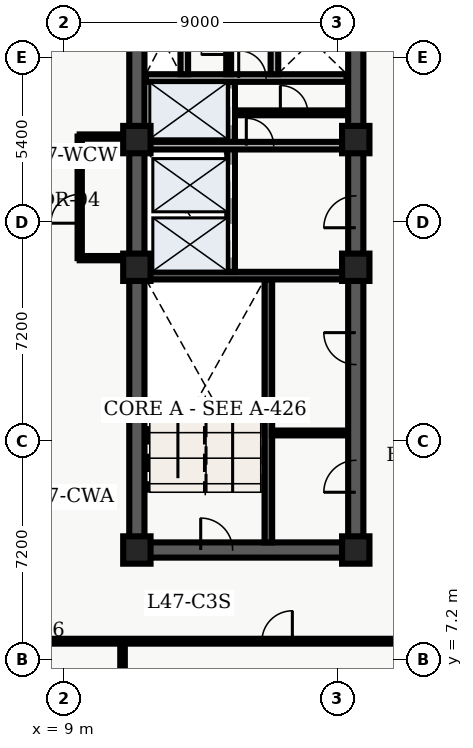
"""IFC4 building model, lengths in metres.
Left out: names, types, materials, properties, quantities, classifications, styles, units other than length and angle.
Written with IfcOpenShell. Run it as: python <this file> out.ifc"""

import sys

from ifc_helpers import new_model, entity, si_unit, converted_unit, direction, frame, origin_with_axes, origin_2d_with_axis, place, context, subcontext, project, spatial, polyline, rectangle, outline, extrude, element, fill, save


model = new_model("IFC4")
c1 = context("Model", 3, precision=1e-05, world=origin_with_axes(), true_north=direction((0.0, 1.0)))
c2 = subcontext(c1, "Body", "Model", "MODEL_VIEW")
j1 = project(units=[si_unit("LENGTHUNIT", "METRE"), converted_unit("PLANEANGLEUNIT", "DEGREE", entity("IfcPlaneAngleMeasure", 0.017), si_unit("PLANEANGLEUNIT", "RADIAN"), dimensions=[0, 0, 0, 0, 0, 0, 0])], contexts=[c1])
p1 = place(None, origin_with_axes())
s1 = spatial("IfcSite", under=j1, at=p1, CompositionType="ELEMENT")
p2 = place(p1, origin_with_axes())
s2 = spatial("IfcBuilding", under=s1, at=p2, CompositionType="ELEMENT")
p3 = place(p2, frame((0.0, 0.0, 192.6), z_axis=(0.0, 0.0, 1.0), x_axis=(1.0, 0.0, 0.0)))
s3 = spatial("IfcBuildingStorey", under=s2, at=p3, CompositionType="ELEMENT", Elevation=192.6)
p4 = place(p3, frame((11.4, 10.8, 0.0), z_axis=(0.0, 0.0, 1.0), x_axis=(0.0, 1.0, 0.0)))
e1 = element("IfcWall", 1, at=p4, inside=s3, PredefinedType="SHEAR", context=c2, shape_type="SweptSolid", body=[
    extrude(outline(polyline([(0.0, -0.25), (27.0, -0.25), (27.0, 0.25), (0.0, 0.25), (0.0, -0.25)])), origin_with_axes(), (0.0, 0.0, 1.0), 3.66),
])
p5 = place(p3, frame((11.4, 10.8, 0.0), z_axis=(0.0, 0.0, 1.0), x_axis=(1.0, 0.0, 0.0)))
e2 = element("IfcWall", 2, at=p5, inside=s3, PredefinedType="SHEAR", context=c2, shape_type="SweptSolid", body=[
    extrude(outline(polyline([(0.0, -0.25), (7.2, -0.25), (7.2, 0.25), (0.0, 0.25), (0.0, -0.25)])), origin_with_axes(), (0.0, 0.0, 1.0), 3.66),
])
p6 = place(p5, frame((2.625, 0.0, 0.0), z_axis=(0.0, 0.0, 1.0), x_axis=(1.0, 0.0, 0.0)))
e3 = element("IfcOpeningElement", 3, at=p6, cuts=e2, PredefinedType="OPENING", context=c2, shape_type="SweptSolid", body=[
    extrude(rectangle(XDim=1.05, YDim=0.52, at=origin_2d_with_axis()), origin_with_axes(), (0.0, 0.0, 1.0), 2.15),
])
p7 = place(p3, frame((18.6, 10.8, 0.0), z_axis=(0.0, 0.0, 1.0), x_axis=(0.0, 1.0, 0.0)))
e4 = element("IfcWall", 4, at=p7, inside=s3, PredefinedType="SHEAR", context=c2, shape_type="SweptSolid", body=[
    extrude(outline(polyline([(0.0, -0.25), (13.5, -0.25), (13.5, 0.25), (0.0, 0.25), (0.0, -0.25)])), origin_with_axes(), (0.0, 0.0, 1.0), 3.66),
])
p8 = place(p7, frame((11.125, 0.0, 0.0), z_axis=(0.0, 0.0, 1.0), x_axis=(1.0, 0.0, 0.0)))
e5 = element("IfcOpeningElement", 5, at=p8, cuts=e4, PredefinedType="OPENING", context=c2, shape_type="SweptSolid", body=[
    extrude(rectangle(XDim=1.05, YDim=0.52, at=origin_2d_with_axis()), origin_with_axes(), (0.0, 0.0, 1.0), 2.15),
])
p9 = place(p7, frame((2.425, 0.0, 0.0), z_axis=(0.0, 0.0, 1.0), x_axis=(1.0, 0.0, 0.0)))
e6 = element("IfcOpeningElement", 6, at=p9, cuts=e4, PredefinedType="OPENING", context=c2, shape_type="SweptSolid", body=[
    extrude(rectangle(XDim=1.05, YDim=0.52, at=origin_2d_with_axis()), origin_with_axes(), (0.0, 0.0, 1.0), 2.15),
])
p10 = place(p7, frame((6.625, 0.0, 0.0), z_axis=(0.0, 0.0, 1.0), x_axis=(1.0, 0.0, 0.0)))
e7 = element("IfcOpeningElement", 7, at=p10, cuts=e4, PredefinedType="OPENING", context=c2, shape_type="SweptSolid", body=[
    extrude(rectangle(XDim=1.05, YDim=0.52, at=origin_2d_with_axis()), origin_with_axes(), (0.0, 0.0, 1.0), 2.15),
])
p11 = place(p3, frame((18.6, 24.3, 0.0), z_axis=(0.0, 0.0, 1.0), x_axis=(0.0, 1.0, 0.0)))
e8 = element("IfcWall", 8, at=p11, inside=s3, PredefinedType="SHEAR", context=c2, shape_type="SweptSolid", body=[
    extrude(outline(polyline([(0.0, -0.25), (13.5, -0.25), (13.5, 0.25), (0.0, 0.25), (0.0, -0.25)])), origin_with_axes(), (0.0, 0.0, 1.0), 3.66),
])
p12 = place(p11, frame((5.65, 0.0, 0.0), z_axis=(0.0, 0.0, 1.0), x_axis=(1.0, 0.0, 0.0)))
e9 = element("IfcOpeningElement", 9, at=p12, cuts=e8, PredefinedType="OPENING", context=c2, shape_type="SweptSolid", body=[
    extrude(rectangle(XDim=1.1, YDim=0.52, at=origin_2d_with_axis()), origin_with_axes(), (0.0, 0.0, 1.0), 2.15),
])
p13 = place(p11, frame((7.75, 0.0, 0.0), z_axis=(0.0, 0.0, 1.0), x_axis=(1.0, 0.0, 0.0)))
e10 = element("IfcOpeningElement", 10, at=p13, cuts=e8, PredefinedType="OPENING", context=c2, shape_type="SweptSolid", body=[
    extrude(rectangle(XDim=1.1, YDim=0.52, at=origin_2d_with_axis()), origin_with_axes(), (0.0, 0.0, 1.0), 2.15),
])
p14 = place(p3, frame((15.725, 11.05, 0.0), z_axis=(0.0, 0.0, 1.0), x_axis=(0.0, 1.0, 0.0)))
e11 = element("IfcWall", 11, at=p14, inside=s3, PredefinedType="SHEAR", context=c2, shape_type="SweptSolid", body=[
    extrude(outline(polyline([(0.0, -0.125), (8.65, -0.125), (8.65, 0.125), (0.0, 0.125), (0.0, -0.125)])), origin_with_axes(), (0.0, 0.0, 1.0), 3.66),
])
p15 = place(p3, frame((11.65, 19.825, 0.0), z_axis=(0.0, 0.0, 1.0), x_axis=(1.0, 0.0, 0.0)))
e12 = element("IfcWall", 12, at=p15, inside=s3, PredefinedType="SHEAR", context=c2, shape_type="SweptSolid", body=[
    extrude(outline(polyline([(0.0, -0.125), (6.7, -0.125), (6.7, 0.125), (0.0, 0.125), (0.0, -0.125)])), origin_with_axes(), (0.0, 0.0, 1.0), 3.66),
])
p16 = place(p3, frame((14.5, 19.95, 0.0), z_axis=(0.0, 0.0, 1.0), x_axis=(0.0, 1.0, 0.0)))
e13 = element("IfcWall", 13, at=p16, inside=s3, PredefinedType="SOLIDWALL", context=c2, shape_type="SweptSolid", body=[
    extrude(outline(polyline([(0.0, -0.125), (6.25, -0.125), (6.25, 0.125), (0.0, 0.125), (0.0, -0.125)])), origin_with_axes(), (0.0, 0.0, 1.0), 2.7),
])
p17 = place(p16, frame((1.025, 0.0, 0.0), z_axis=(0.0, 0.0, 1.0), x_axis=(1.0, 0.0, 0.0)))
e14 = element("IfcOpeningElement", 14, at=p17, cuts=e13, PredefinedType="OPENING", context=c2, shape_type="SweptSolid", body=[
    extrude(rectangle(XDim=1.1, YDim=0.27, at=origin_2d_with_axis()), origin_with_axes(), (0.0, 0.0, 1.0), 2.15),
])
p18 = place(p16, frame((2.975, 0.0, 0.0), z_axis=(0.0, 0.0, 1.0), x_axis=(1.0, 0.0, 0.0)))
e15 = element("IfcOpeningElement", 15, at=p18, cuts=e13, PredefinedType="OPENING", context=c2, shape_type="SweptSolid", body=[
    extrude(rectangle(XDim=1.1, YDim=0.27, at=origin_2d_with_axis()), origin_with_axes(), (0.0, 0.0, 1.0), 2.15),
])
p19 = place(p16, frame((5.425, 0.0, 0.0), z_axis=(0.0, 0.0, 1.0), x_axis=(1.0, 0.0, 0.0)))
e16 = element("IfcOpeningElement", 16, at=p19, cuts=e13, PredefinedType="OPENING", context=c2, shape_type="SweptSolid", body=[
    extrude(rectangle(XDim=1.2, YDim=0.27, at=origin_2d_with_axis()), origin_with_axes(), (0.0, 0.0, 1.0), 2.15),
])
p20 = place(p3, frame((11.7, 24.1, 0.0), z_axis=(0.0, 0.0, 1.0), x_axis=(1.0, 0.0, 0.0)))
e17 = element("IfcWall", 17, at=p20, inside=s3, PredefinedType="SOLIDWALL", context=c2, shape_type="SweptSolid", body=[
    extrude(outline(polyline([(0.0, -0.125), (6.6, -0.125), (6.6, 0.125), (0.0, 0.125), (0.0, -0.125)])), origin_with_axes(), (0.0, 0.0, 1.0), 2.7),
])
p21 = place(p20, frame((3.75, 0.0, 0.0), z_axis=(0.0, 0.0, 1.0), x_axis=(1.0, 0.0, 0.0)))
e18 = element("IfcOpeningElement", 18, at=p21, cuts=e17, PredefinedType="OPENING", context=c2, shape_type="SweptSolid", body=[
    extrude(rectangle(XDim=0.9, YDim=0.27, at=origin_2d_with_axis()), origin_with_axes(), (0.0, 0.0, 1.0), 2.15),
])
p22 = place(p3, frame((11.7, 26.325, 0.0), z_axis=(0.0, 0.0, 1.0), x_axis=(1.0, 0.0, 0.0)))
e19 = element("IfcWall", 19, at=p22, inside=s3, PredefinedType="SOLIDWALL", context=c2, shape_type="SweptSolid", body=[
    extrude(outline(polyline([(0.0, -0.125), (6.6, -0.125), (6.6, 0.125), (0.0, 0.125), (0.0, -0.125)])), origin_with_axes(), (0.0, 0.0, 1.0), 2.7),
])
p23 = place(p22, frame((3.5, 0.0, 0.0), z_axis=(0.0, 0.0, 1.0), x_axis=(1.0, 0.0, 0.0)))
e20 = element("IfcOpeningElement", 20, at=p23, cuts=e19, PredefinedType="OPENING", context=c2, shape_type="SweptSolid", body=[
    extrude(rectangle(XDim=0.9, YDim=0.27, at=origin_2d_with_axis()), origin_with_axes(), (0.0, 0.0, 1.0), 2.15),
])
for number, where, z_axis, x_axis in (
    (21, (12.96, 26.45, 0.0), (0.0, 0.0, 1.0), (0.0, 1.0, 0.0)),
    (22, (15.925, 26.45, 0.0), (0.0, 0.0, 1.0), (0.0, 1.0, 0.0)),
):
    element("IfcWall", number, at=place(p3, frame(where, z_axis=z_axis, x_axis=x_axis)), inside=s3, PredefinedType="SOLIDWALL", context=c2, shape_type="SweptSolid", body=[
        extrude(outline(polyline([(0.0, -0.125), (2.2, -0.125), (2.2, 0.125), (0.0, 0.125), (0.0, -0.125)])), origin_with_axes(), (0.0, 0.0, 1.0), 2.7),
    ])
for number, where, z_axis, x_axis in (
    (23, (11.4, 10.8, 0.0), (0.0, 0.0, 1.0), (1.0, 0.0, 0.0)),
    (24, (11.4, 20.1, 0.0), (0.0, 0.0, 1.0), (1.0, 0.0, 0.0)),
    (25, (11.4, 24.3, 0.0), (0.0, 0.0, 1.0), (1.0, 0.0, 0.0)),
    (26, (18.6, 10.8, 0.0), (0.0, 0.0, 1.0), (1.0, 0.0, 0.0)),
    (27, (18.6, 20.1, 0.0), (0.0, 0.0, 1.0), (1.0, 0.0, 0.0)),
    (28, (18.6, 24.3, 0.0), (0.0, 0.0, 1.0), (1.0, 0.0, 0.0)),
):
    element("IfcColumn", number, at=place(p3, frame(where, z_axis=z_axis, x_axis=x_axis)), inside=s3, PredefinedType="COLUMN", context=c2, shape_type="SweptSolid", body=[
        extrude(rectangle(XDim=0.9, YDim=0.9, at=origin_2d_with_axis()), origin_with_axes(), (0.0, 0.0, 1.0), 3.9),
    ])
p24 = place(p3, frame((14.62, 25.18, 0.0), z_axis=(0.0, 0.0, 1.0), x_axis=(1.0, 0.0, 0.0)))
e29 = element("IfcWall", 29, at=p24, inside=s3, PredefinedType="PARTITIONING", context=c2, shape_type="SweptSolid", body=[
    extrude(outline(polyline([(0.0, -0.08), (3.68, -0.08), (3.68, 0.08), (0.0, 0.08), (0.0, -0.08)])), origin_with_axes(), (0.0, 0.0, 1.0), 2.7),
])
p25 = place(p24, frame((1.95, 0.0, 0.0), z_axis=(0.0, 0.0, 1.0), x_axis=(1.0, 0.0, 0.0)))
e30 = element("IfcOpeningElement", 30, at=p25, cuts=e29, PredefinedType="OPENING", context=c2, shape_type="SweptSolid", body=[
    extrude(rectangle(XDim=0.9, YDim=0.18, at=origin_2d_with_axis()), origin_with_axes(), (0.0, 0.0, 1.0), 2.15),
])
p26 = place(p3, frame((14.42, 26.45, 0.0), z_axis=(0.0, 0.0, 1.0), x_axis=(0.0, 1.0, 0.0)))
e31 = element("IfcWall", 31, at=p26, inside=s3, PredefinedType="PARTITIONING", context=c2, shape_type="SweptSolid", body=[
    extrude(outline(polyline([(0.0, -0.08), (2.2, -0.08), (2.2, 0.08), (0.0, 0.08), (0.0, -0.08)])), origin_with_axes(), (0.0, 0.0, 1.0), 2.7),
])
p27 = place(p26, frame((1.1, 0.0, 0.0), z_axis=(0.0, 0.0, 1.0), x_axis=(1.0, 0.0, 0.0)))
e32 = element("IfcOpeningElement", 32, at=p27, cuts=e31, PredefinedType="OPENING", context=c2, shape_type="SweptSolid", body=[
    extrude(rectangle(XDim=0.9, YDim=0.18, at=origin_2d_with_axis()), origin_with_axes(), (0.0, 0.0, 1.0), 2.15),
])
p28 = place(p3, frame((15.84, 14.65, 0.0), z_axis=(0.0, 0.0, 1.0), x_axis=(1.0, 0.0, 0.0)))
e33 = element("IfcWall", 33, at=p28, inside=s3, PredefinedType="PARTITIONING", context=c2, shape_type="SweptSolid", body=[
    extrude(outline(polyline([(0.0, -0.08), (2.46, -0.08), (2.46, 0.08), (0.0, 0.08), (0.0, -0.08)])), origin_with_axes(), (0.0, 0.0, 1.0), 2.7),
])
p29 = place(p3, frame((9.52, 20.4, 0.0), z_axis=(0.0, 0.0, 1.0), x_axis=(0.0, 1.0, 0.0)))
e34 = element("IfcWall", 34, at=p29, inside=s3, PredefinedType="PARTITIONING", context=c2, shape_type="SweptSolid", body=[
    extrude(outline(polyline([(0.0, -0.07), (4.0, -0.07), (4.0, 0.07), (0.0, 0.07), (0.0, -0.07)])), origin_with_axes(), (0.0, 0.0, 1.0), 2.7),
])
p30 = place(p29, frame((1.625, 0.0, 0.0), z_axis=(0.0, 0.0, 1.0), x_axis=(1.0, 0.0, 0.0)))
e35 = element("IfcOpeningElement", 35, at=p30, cuts=e34, PredefinedType="OPENING", context=c2, shape_type="SweptSolid", body=[
    extrude(rectangle(XDim=0.95, YDim=0.16, at=origin_2d_with_axis()), origin_with_axes(), (0.0, 0.0, 1.0), 2.15),
])
for number, where, z_axis, x_axis in (
    (36, (9.52, 20.4, 0.0), (0.0, 0.0, 1.0), (1.0, 0.0, 0.0)),
    (37, (9.52, 24.4, 0.0), (0.0, 0.0, 1.0), (1.0, 0.0, 0.0)),
):
    element("IfcWall", number, at=place(p3, frame(where, z_axis=z_axis, x_axis=x_axis)), inside=s3, PredefinedType="PARTITIONING", context=c2, shape_type="SweptSolid", body=[
        extrude(outline(polyline([(0.0, -0.07), (1.58, -0.07), (1.58, 0.07), (0.0, 0.07), (0.0, -0.07)])), origin_with_axes(), (0.0, 0.0, 1.0), 2.7),
    ])
p31 = place(p3, frame((2.6, 7.8, 0.0), z_axis=(0.0, 0.0, 1.0), x_axis=(1.0, 0.0, 0.0)))
e38 = element("IfcWall", 38, at=p31, inside=s3, PredefinedType="PARTITIONING", context=c2, shape_type="SweptSolid", body=[
    extrude(outline(polyline([(0.0, -0.08), (18.55, -0.08), (18.55, 0.08), (0.0, 0.08), (0.0, -0.08)])), origin_with_axes(), (0.0, 0.0, 1.0), 2.7),
])
p32 = place(p31, frame((5.04, 0.0, 0.0), z_axis=(0.0, 0.0, 1.0), x_axis=(1.0, 0.0, 0.0)))
e39 = element("IfcOpeningElement", 39, at=p32, cuts=e38, PredefinedType="OPENING", context=c2, shape_type="SweptSolid", body=[
    extrude(rectangle(XDim=1.2, YDim=0.18, at=origin_2d_with_axis()), origin_with_axes(), (0.0, 0.0, 1.0), 2.2),
])
p33 = place(p31, frame((13.415, 0.0, 0.0), z_axis=(0.0, 0.0, 1.0), x_axis=(1.0, 0.0, 0.0)))
e40 = element("IfcOpeningElement", 40, at=p33, cuts=e38, PredefinedType="OPENING", context=c2, shape_type="SweptSolid", body=[
    extrude(rectangle(XDim=1.0, YDim=0.18, at=origin_2d_with_axis()), origin_with_axes(), (0.0, 0.0, 1.0), 2.15),
])
p34 = place(p3, frame((10.929, 0.335, 0.0), z_axis=(0.0, 0.0, 1.0), x_axis=(0.0, 1.0, 0.0)))
e41 = element("IfcWall", 41, at=p34, inside=s3, PredefinedType="PARTITIONING", context=c2, shape_type="SweptSolid", body=[
    extrude(outline(polyline([(0.0, -0.075), (7.365, -0.075), (7.365, 0.075), (0.0, 0.075), (0.0, -0.075)])), origin_with_axes(), (0.0, 0.0, 1.0), 2.7),
])
p35 = place(p16, frame((1.025, 0.0, 0.0), z_axis=(0.0, 0.0, 1.0), x_axis=(1.0, 0.0, 0.0)))
e42 = element("IfcDoor", 42, at=p35, inside=s3, OperationType="SLIDING_TO_LEFT", PredefinedType="DOOR", context=c2, shape_type="SweptSolid", body=[
    extrude(rectangle(XDim=1.1, YDim=0.09, at=origin_2d_with_axis()), origin_with_axes(), (0.0, 0.0, 1.0), 2.15),
])
fill(e14, e42)
p36 = place(p16, frame((2.975, 0.0, 0.0), z_axis=(0.0, 0.0, 1.0), x_axis=(1.0, 0.0, 0.0)))
e43 = element("IfcDoor", 43, at=p36, inside=s3, OperationType="SLIDING_TO_RIGHT", PredefinedType="DOOR", context=c2, shape_type="SweptSolid", body=[
    extrude(rectangle(XDim=1.1, YDim=0.09, at=origin_2d_with_axis()), origin_with_axes(), (0.0, 0.0, 1.0), 2.15),
])
fill(e15, e43)
p37 = place(p16, frame((5.425, 0.0, 0.0), z_axis=(0.0, 0.0, 1.0), x_axis=(1.0, 0.0, 0.0)))
e44 = element("IfcDoor", 44, at=p37, inside=s3, OperationType="DOUBLE_DOOR_SLIDING", PredefinedType="DOOR", context=c2, shape_type="SweptSolid", body=[
    extrude(rectangle(XDim=1.2, YDim=0.09, at=origin_2d_with_axis()), origin_with_axes(), (0.0, 0.0, 1.0), 2.15),
])
fill(e16, e44)
p38 = place(p5, frame((2.625, 0.0, 0.0), z_axis=(0.0, 0.0, 1.0), x_axis=(1.0, 0.0, 0.0)))
e45 = element("IfcDoor", 45, at=p38, inside=s3, OperationType="SINGLE_SWING_LEFT", PredefinedType="DOOR", context=c2, shape_type="SweptSolid", body=[
    extrude(rectangle(XDim=1.05, YDim=0.09, at=origin_2d_with_axis()), origin_with_axes(), (0.0, 0.0, 1.0), 2.15),
])
fill(e3, e45)
p39 = place(p7, frame((11.125, 0.0, 0.0), z_axis=(0.0, 0.0, 1.0), x_axis=(1.0, 0.0, 0.0)))
e46 = element("IfcDoor", 46, at=p39, inside=s3, OperationType="SINGLE_SWING_LEFT", PredefinedType="DOOR", context=c2, shape_type="SweptSolid", body=[
    extrude(rectangle(XDim=1.05, YDim=0.09, at=origin_2d_with_axis()), origin_with_axes(), (0.0, 0.0, 1.0), 2.15),
])
fill(e5, e46)
p40 = place(p22, frame((3.5, 0.0, 0.0), z_axis=(0.0, 0.0, 1.0), x_axis=(1.0, 0.0, 0.0)))
e47 = element("IfcDoor", 47, at=p40, inside=s3, OperationType="SINGLE_SWING_LEFT", PredefinedType="DOOR", context=c2, shape_type="SweptSolid", body=[
    extrude(rectangle(XDim=0.9, YDim=0.09, at=origin_2d_with_axis()), origin_with_axes(), (0.0, 0.0, 1.0), 2.15),
])
fill(e20, e47)
p41 = place(p26, frame((1.1, 0.0, 0.0), z_axis=(0.0, 0.0, 1.0), x_axis=(1.0, 0.0, 0.0)))
e48 = element("IfcDoor", 48, at=p41, inside=s3, OperationType="SINGLE_SWING_LEFT", PredefinedType="DOOR", context=c2, shape_type="SweptSolid", body=[
    extrude(rectangle(XDim=0.9, YDim=0.09, at=origin_2d_with_axis()), origin_with_axes(), (0.0, 0.0, 1.0), 2.15),
])
fill(e32, e48)
p42 = place(p20, frame((3.75, 0.0, 0.0), z_axis=(0.0, 0.0, 1.0), x_axis=(1.0, 0.0, 0.0)))
e49 = element("IfcDoor", 49, at=p42, inside=s3, OperationType="SINGLE_SWING_LEFT", PredefinedType="DOOR", context=c2, shape_type="SweptSolid", body=[
    extrude(rectangle(XDim=0.9, YDim=0.09, at=origin_2d_with_axis()), origin_with_axes(), (0.0, 0.0, 1.0), 2.15),
])
fill(e18, e49)
p43 = place(p24, frame((1.95, 0.0, 0.0), z_axis=(0.0, 0.0, 1.0), x_axis=(1.0, 0.0, 0.0)))
e50 = element("IfcDoor", 50, at=p43, inside=s3, OperationType="SINGLE_SWING_LEFT", PredefinedType="DOOR", context=c2, shape_type="SweptSolid", body=[
    extrude(rectangle(XDim=0.9, YDim=0.09, at=origin_2d_with_axis()), origin_with_axes(), (0.0, 0.0, 1.0), 2.15),
])
fill(e30, e50)
p44 = place(p7, frame((2.425, 0.0, 0.0), z_axis=(0.0, 0.0, 1.0), x_axis=(1.0, 0.0, 0.0)))
e51 = element("IfcDoor", 51, at=p44, inside=s3, OperationType="SINGLE_SWING_LEFT", PredefinedType="DOOR", context=c2, shape_type="SweptSolid", body=[
    extrude(rectangle(XDim=1.05, YDim=0.09, at=origin_2d_with_axis()), origin_with_axes(), (0.0, 0.0, 1.0), 2.15),
])
fill(e6, e51)
p45 = place(p7, frame((6.625, 0.0, 0.0), z_axis=(0.0, 0.0, 1.0), x_axis=(1.0, 0.0, 0.0)))
e52 = element("IfcDoor", 52, at=p45, inside=s3, OperationType="SINGLE_SWING_RIGHT", PredefinedType="DOOR", context=c2, shape_type="SweptSolid", body=[
    extrude(rectangle(XDim=1.05, YDim=0.09, at=origin_2d_with_axis()), origin_with_axes(), (0.0, 0.0, 1.0), 2.15),
])
fill(e7, e52)
p46 = place(p29, frame((1.625, 0.0, 0.0), z_axis=(0.0, 0.0, 1.0), x_axis=(1.0, 0.0, 0.0)))
e53 = element("IfcDoor", 53, at=p46, inside=s3, OperationType="SINGLE_SWING_LEFT", PredefinedType="DOOR", context=c2, shape_type="SweptSolid", body=[
    extrude(rectangle(XDim=0.95, YDim=0.084, at=origin_2d_with_axis()), origin_with_axes(), (0.0, 0.0, 1.0), 2.15),
])
fill(e35, e53)
p47 = place(p31, frame((13.415, 0.0, 0.0), z_axis=(0.0, 0.0, 1.0), x_axis=(1.0, 0.0, 0.0)))
e54 = element("IfcDoor", 54, at=p47, inside=s3, OperationType="SINGLE_SWING_RIGHT", PredefinedType="DOOR", context=c2, shape_type="SweptSolid", body=[
    extrude(rectangle(XDim=1.0, YDim=0.09, at=origin_2d_with_axis()), origin_with_axes(), (0.0, 0.0, 1.0), 2.15),
])
fill(e40, e54)
save(model, sys.argv[1])
